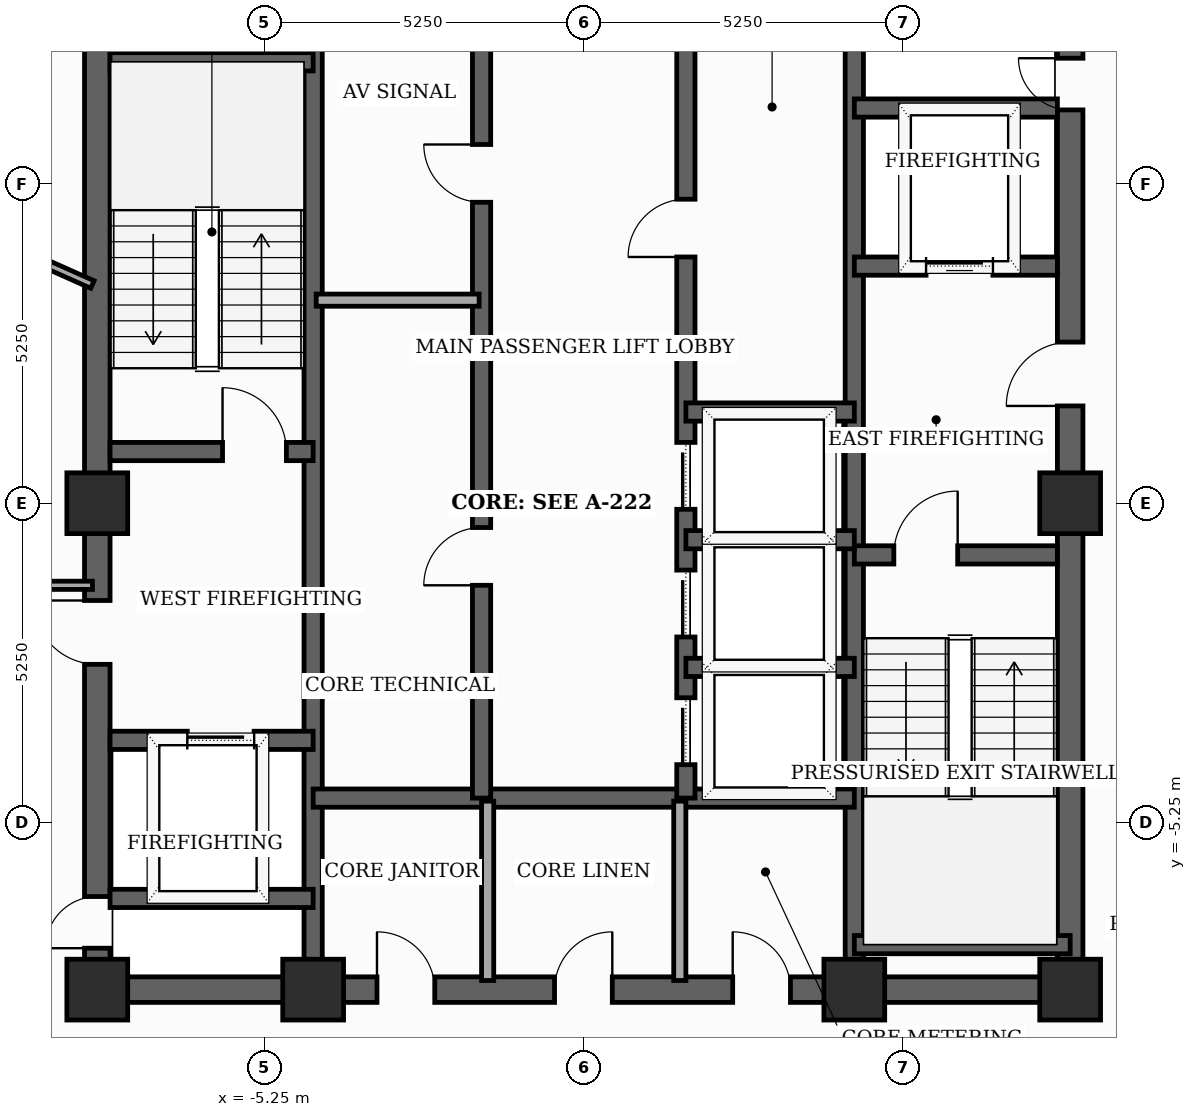
"""IFC4 building model, lengths in metres.
Left out: names, types, materials, properties, quantities, classifications, styles, units other than length and angle.
Written with IfcOpenShell. Run it as: python <this file> out.ifc"""

import sys

from ifc_helpers import new_model, si_unit, direction, frame, frame_2d, origin, origin_2d, place, context, subcontext, project, spatial, rectangle, extrude, element, fill, save


model = new_model("IFC4")
c1 = context("Model", 3, precision=1e-05, world=origin(), true_north=direction((0.0, 1.0)))
c2 = subcontext(c1, "Body", "Model", "MODEL_VIEW")
j1 = project(units=[si_unit("LENGTHUNIT", "METRE"), si_unit("PLANEANGLEUNIT", "RADIAN")], contexts=[c1])
p1 = place(None, origin())
s1 = spatial("IfcSite", under=j1, at=p1, CompositionType="ELEMENT")
p2 = place(p1, origin())
s2 = spatial("IfcBuilding", under=s1, at=p2, CompositionType="ELEMENT")
p3 = place(p2, frame((0.0, 0.0, 298.0)))
s3 = spatial("IfcBuildingStorey", under=s2, at=p3, CompositionType="ELEMENT", Elevation=298.0)
for number, where, z_axis, x_axis in (
    (1, (-8.0, -8.0, 0.0), (0.0, 0.0, 1.0), (1.0, 0.0, 0.0)),
    (2, (-4.45, -8.0, 0.0), (0.0, 0.0, 1.0), (1.0, 0.0, 0.0)),
    (3, (4.45, -8.0, 0.0), (0.0, 0.0, 1.0), (1.0, 0.0, 0.0)),
    (4, (8.0, -8.0, 0.0), (0.0, 0.0, 1.0), (1.0, 0.0, 0.0)),
    (5, (8.0, 0.0, 0.0), (0.0, 0.0, 1.0), (1.0, 0.0, 0.0)),
    (6, (-8.0, 0.0, 0.0), (0.0, 0.0, 1.0), (1.0, 0.0, 0.0)),
):
    element("IfcColumn", number, at=place(p3, frame(where, z_axis=z_axis, x_axis=x_axis)), inside=s3, PredefinedType="COLUMN", context=c2, shape_type="SweptSolid", body=[
        extrude(rectangle(XDim=1.0, YDim=1.0, at=origin_2d()), origin(), (0.0, 0.0, 1.0), 3.7),
    ])
p4 = place(p3, frame((-8.0, -8.0, 0.0), z_axis=(0.0, 0.0, 1.0), x_axis=(0.0, 1.0, 0.0)))
e7 = element("IfcWall", 7, at=p4, inside=s3, PredefinedType="SHEAR", context=c2, shape_type="SweptSolid", body=[
    extrude(rectangle(XDim=16.0, YDim=0.42, at=frame_2d((8.0, 0.0))), origin(), (0.0, 0.0, 1.0), 3.5),
])
p5 = place(p4, frame((0.681, 0.0, 0.0)))
e8 = element("IfcOpeningElement", 8, at=p5, cuts=e7, PredefinedType="OPENING", context=c2, shape_type="SweptSolid", body=[
    extrude(rectangle(XDim=0.85, YDim=2.02, at=frame_2d((0.425, 1.01))), frame((0.0, 0.22, 0.0), z_axis=(0.0, -1.0, 0.0), x_axis=(1.0, 0.0, 0.0)), (0.0, 0.0, 1.0), 0.44),
])
p6 = place(p4, frame((5.35, 0.0, 0.0)))
e9 = element("IfcOpeningElement", 9, at=p6, cuts=e7, PredefinedType="OPENING", context=c2, shape_type="SweptSolid", body=[
    extrude(rectangle(XDim=1.05, YDim=2.15, at=frame_2d((0.525, 1.075))), frame((0.0, 0.22, 0.0), z_axis=(0.0, -1.0, 0.0), x_axis=(1.0, 0.0, 0.0)), (0.0, 0.0, 1.0), 0.44),
])
p7 = place(p3, frame((8.0, -8.0, 0.0), z_axis=(0.0, 0.0, 1.0), x_axis=(0.0, 1.0, 0.0)))
e10 = element("IfcWall", 10, at=p7, inside=s3, PredefinedType="SHEAR", context=c2, shape_type="SweptSolid", body=[
    extrude(rectangle(XDim=16.0, YDim=0.42, at=frame_2d((8.0, 0.0))), origin(), (0.0, 0.0, 1.0), 3.5),
])
p8 = place(p7, frame((9.6, 0.0, 0.0)))
e11 = element("IfcOpeningElement", 11, at=p8, cuts=e10, PredefinedType="OPENING", context=c2, shape_type="SweptSolid", body=[
    extrude(rectangle(XDim=1.05, YDim=2.15, at=frame_2d((0.525, 1.075))), frame((0.0, 0.22, 0.0), z_axis=(0.0, -1.0, 0.0), x_axis=(1.0, 0.0, 0.0)), (0.0, 0.0, 1.0), 0.44),
])
p9 = place(p7, frame((14.469, 0.0, 0.0)))
e12 = element("IfcOpeningElement", 12, at=p9, cuts=e10, PredefinedType="OPENING", context=c2, shape_type="SweptSolid", body=[
    extrude(rectangle(XDim=0.85, YDim=2.02, at=frame_2d((0.425, 1.01))), frame((0.0, 0.22, 0.0), z_axis=(0.0, -1.0, 0.0), x_axis=(1.0, 0.0, 0.0)), (0.0, 0.0, 1.0), 0.44),
])
p10 = place(p3, frame((-8.0, -8.0, 0.0), z_axis=(0.0, 0.0, 1.0), x_axis=(1.0, 0.0, 0.0)))
e13 = element("IfcWall", 13, at=p10, inside=s3, PredefinedType="SHEAR", context=c2, shape_type="SweptSolid", body=[
    extrude(rectangle(XDim=16.0, YDim=0.42, at=frame_2d((8.0, 0.0))), origin(), (0.0, 0.0, 1.0), 3.5),
])
p11 = place(p10, frame((4.6, 0.0, 0.0)))
e14 = element("IfcOpeningElement", 14, at=p11, cuts=e13, PredefinedType="OPENING", context=c2, shape_type="SweptSolid", body=[
    extrude(rectangle(XDim=0.95, YDim=2.1, at=frame_2d((0.475, 1.05))), frame((0.0, 0.22, 0.0), z_axis=(0.0, -1.0, 0.0), x_axis=(1.0, 0.0, 0.0)), (0.0, 0.0, 1.0), 0.44),
])
p12 = place(p10, frame((7.52, 0.0, 0.0)))
e15 = element("IfcOpeningElement", 15, at=p12, cuts=e13, PredefinedType="OPENING", context=c2, shape_type="SweptSolid", body=[
    extrude(rectangle(XDim=0.95, YDim=2.1, at=frame_2d((0.475, 1.05))), frame((0.0, 0.22, 0.0), z_axis=(0.0, -1.0, 0.0), x_axis=(1.0, 0.0, 0.0)), (0.0, 0.0, 1.0), 0.44),
])
p13 = place(p10, frame((10.45, 0.0, 0.0)))
e16 = element("IfcOpeningElement", 16, at=p13, cuts=e13, PredefinedType="OPENING", context=c2, shape_type="SweptSolid", body=[
    extrude(rectangle(XDim=0.95, YDim=2.1, at=frame_2d((0.475, 1.05))), frame((0.0, 0.22, 0.0), z_axis=(0.0, -1.0, 0.0), x_axis=(1.0, 0.0, 0.0)), (0.0, 0.0, 1.0), 0.44),
])
for number, where, z_axis, x_axis in (
    (17, (-4.45, -7.79, 0.0), (0.0, 0.0, 1.0), (0.0, 1.0, 0.0)),
    (18, (4.45, -7.79, 0.0), (0.0, 0.0, 1.0), (0.0, 1.0, 0.0)),
):
    element("IfcWall", number, at=place(p3, frame(where, z_axis=z_axis, x_axis=x_axis)), inside=s3, PredefinedType="SHEAR", context=c2, shape_type="SweptSolid", body=[
        extrude(rectangle(XDim=15.58, YDim=0.3, at=frame_2d((7.79, 0.0))), origin(), (0.0, 0.0, 1.0), 3.5),
    ])
p14 = place(p3, frame((-7.79, 0.85, 0.0), z_axis=(0.0, 0.0, 1.0), x_axis=(1.0, 0.0, 0.0)))
e19 = element("IfcWall", 19, at=p14, inside=s3, PredefinedType="SHEAR", context=c2, shape_type="SweptSolid", body=[
    extrude(rectangle(XDim=3.34, YDim=0.3, at=frame_2d((1.67, 0.0))), origin(), (0.0, 0.0, 1.0), 3.5),
])
p15 = place(p14, frame((1.85, 0.0, 0.0)))
e20 = element("IfcOpeningElement", 20, at=p15, cuts=e19, PredefinedType="OPENING", context=c2, shape_type="SweptSolid", body=[
    extrude(rectangle(XDim=1.05, YDim=2.15, at=frame_2d((0.525, 1.075))), frame((0.0, 0.16, 0.0), z_axis=(0.0, -1.0, 0.0), x_axis=(1.0, 0.0, 0.0)), (0.0, 0.0, 1.0), 0.32),
])
p16 = place(p3, frame((-7.79, 7.26, 0.0), z_axis=(0.0, 0.0, 1.0), x_axis=(1.0, 0.0, 0.0)))
e21 = element("IfcWall", 21, at=p16, inside=s3, PredefinedType="SHEAR", context=c2, shape_type="SweptSolid", body=[
    extrude(rectangle(XDim=3.34, YDim=0.3, at=frame_2d((1.67, 0.0))), origin(), (0.0, 0.0, 1.0), 3.5),
])
p17 = place(p3, frame((4.45, -0.85, 0.0), z_axis=(0.0, 0.0, 1.0), x_axis=(1.0, 0.0, 0.0)))
e22 = element("IfcWall", 22, at=p17, inside=s3, PredefinedType="SHEAR", context=c2, shape_type="SweptSolid", body=[
    extrude(rectangle(XDim=3.34, YDim=0.3, at=frame_2d((1.67, 0.0))), origin(), (0.0, 0.0, 1.0), 3.5),
])
p18 = place(p17, frame((0.65, 0.0, 0.0)))
e23 = element("IfcOpeningElement", 23, at=p18, cuts=e22, PredefinedType="OPENING", context=c2, shape_type="SweptSolid", body=[
    extrude(rectangle(XDim=1.05, YDim=2.15, at=frame_2d((0.525, 1.075))), frame((0.0, 0.16, 0.0), z_axis=(0.0, -1.0, 0.0), x_axis=(1.0, 0.0, 0.0)), (0.0, 0.0, 1.0), 0.32),
])
p19 = place(p3, frame((4.45, -7.26, 0.0), z_axis=(0.0, 0.0, 1.0), x_axis=(1.0, 0.0, 0.0)))
e24 = element("IfcWall", 24, at=p19, inside=s3, PredefinedType="SHEAR", context=c2, shape_type="SweptSolid", body=[
    extrude(rectangle(XDim=3.55, YDim=0.3, at=frame_2d((1.775, 0.0))), origin(), (0.0, 0.0, 1.0), 3.5),
])
p20 = place(p3, frame((-7.79, -3.9, 0.0), z_axis=(0.0, 0.0, 1.0), x_axis=(1.0, 0.0, 0.0)))
e25 = element("IfcWall", 25, at=p20, inside=s3, PredefinedType="SHEAR", context=c2, shape_type="SweptSolid", body=[
    extrude(rectangle(XDim=3.34, YDim=0.3, at=frame_2d((1.67, 0.0))), origin(), (0.0, 0.0, 1.0), 3.5),
])
p21 = place(p20, frame((1.27, 0.0, 0.0)))
e26 = element("IfcOpeningElement", 26, at=p21, cuts=e25, PredefinedType="OPENING", context=c2, shape_type="SweptSolid", body=[
    extrude(rectangle(XDim=1.1, YDim=2.1, at=frame_2d((0.55, 1.05))), frame((0.0, 0.16, 0.0), z_axis=(0.0, -1.0, 0.0), x_axis=(1.0, 0.0, 0.0)), (0.0, 0.0, 1.0), 0.32),
])
p22 = place(p3, frame((-7.79, -6.5, 0.0), z_axis=(0.0, 0.0, 1.0), x_axis=(1.0, 0.0, 0.0)))
e27 = element("IfcWall", 27, at=p22, inside=s3, PredefinedType="SHEAR", context=c2, shape_type="SweptSolid", body=[
    extrude(rectangle(XDim=3.34, YDim=0.3, at=frame_2d((1.67, 0.0))), origin(), (0.0, 0.0, 1.0), 3.5),
])
p23 = place(p3, frame((4.45, 3.9, 0.0), z_axis=(0.0, 0.0, 1.0), x_axis=(1.0, 0.0, 0.0)))
e28 = element("IfcWall", 28, at=p23, inside=s3, PredefinedType="SHEAR", context=c2, shape_type="SweptSolid", body=[
    extrude(rectangle(XDim=3.34, YDim=0.3, at=frame_2d((1.67, 0.0))), origin(), (0.0, 0.0, 1.0), 3.5),
])
p24 = place(p23, frame((1.18, 0.0, 0.0)))
e29 = element("IfcOpeningElement", 29, at=p24, cuts=e28, PredefinedType="OPENING", context=c2, shape_type="SweptSolid", body=[
    extrude(rectangle(XDim=1.1, YDim=2.1, at=frame_2d((0.55, 1.05))), frame((0.0, 0.16, 0.0), z_axis=(0.0, -1.0, 0.0), x_axis=(1.0, 0.0, 0.0)), (0.0, 0.0, 1.0), 0.32),
])
p25 = place(p3, frame((4.45, 6.5, 0.0), z_axis=(0.0, 0.0, 1.0), x_axis=(1.0, 0.0, 0.0)))
e30 = element("IfcWall", 30, at=p25, inside=s3, PredefinedType="SHEAR", context=c2, shape_type="SweptSolid", body=[
    extrude(rectangle(XDim=3.34, YDim=0.3, at=frame_2d((1.67, 0.0))), origin(), (0.0, 0.0, 1.0), 3.5),
])
p26 = place(p3, frame((-4.45, -4.85, 0.0), z_axis=(0.0, 0.0, 1.0), x_axis=(1.0, 0.0, 0.0)))
e31 = element("IfcWall", 31, at=p26, inside=s3, PredefinedType="SHEAR", context=c2, shape_type="SweptSolid", body=[
    extrude(rectangle(XDim=8.9, YDim=0.3, at=frame_2d((4.45, 0.0))), origin(), (0.0, 0.0, 1.0), 3.5),
])
p27 = place(p3, frame((-1.68, -4.85, 0.0), z_axis=(0.0, 0.0, 1.0), x_axis=(0.0, 1.0, 0.0)))
e32 = element("IfcWall", 32, at=p27, inside=s3, PredefinedType="SHEAR", context=c2, shape_type="SweptSolid", body=[
    extrude(rectangle(XDim=12.64, YDim=0.3, at=frame_2d((6.32, 0.0))), origin(), (0.0, 0.0, 1.0), 3.5),
])
p28 = place(p27, frame((3.5, 0.0, 0.0)))
e33 = element("IfcOpeningElement", 33, at=p28, cuts=e32, PredefinedType="OPENING", context=c2, shape_type="SweptSolid", body=[
    extrude(rectangle(XDim=0.95, YDim=2.1, at=frame_2d((0.475, 1.05))), frame((0.0, 0.16, 0.0), z_axis=(0.0, -1.0, 0.0), x_axis=(1.0, 0.0, 0.0)), (0.0, 0.0, 1.0), 0.32),
])
p29 = place(p27, frame((9.8, 0.0, 0.0)))
e34 = element("IfcOpeningElement", 34, at=p29, cuts=e32, PredefinedType="OPENING", context=c2, shape_type="SweptSolid", body=[
    extrude(rectangle(XDim=0.95, YDim=2.1, at=frame_2d((0.475, 1.05))), frame((0.0, 0.16, 0.0), z_axis=(0.0, -1.0, 0.0), x_axis=(1.0, 0.0, 0.0)), (0.0, 0.0, 1.0), 0.32),
])
p30 = place(p3, frame((1.68, -4.85, 0.0), z_axis=(0.0, 0.0, 1.0), x_axis=(0.0, 1.0, 0.0)))
e35 = element("IfcWall", 35, at=p30, inside=s3, PredefinedType="SHEAR", context=c2, shape_type="SweptSolid", body=[
    extrude(rectangle(XDim=12.64, YDim=0.3, at=frame_2d((6.32, 0.0))), origin(), (0.0, 0.0, 1.0), 3.5),
])
p31 = place(p30, frame((0.55, 0.0, 0.0)))
e36 = element("IfcOpeningElement", 36, at=p31, cuts=e35, PredefinedType="OPENING", context=c2, shape_type="SweptSolid", body=[
    extrude(rectangle(XDim=1.1, YDim=2.1, at=frame_2d((0.55, 1.05))), frame((0.0, 0.16, 0.0), z_axis=(0.0, -1.0, 0.0), x_axis=(1.0, 0.0, 0.0)), (0.0, 0.0, 1.0), 0.32),
])
p32 = place(p30, frame((2.65, 0.0, 0.0)))
e37 = element("IfcOpeningElement", 37, at=p32, cuts=e35, PredefinedType="OPENING", context=c2, shape_type="SweptSolid", body=[
    extrude(rectangle(XDim=1.1, YDim=2.1, at=frame_2d((0.55, 1.05))), frame((0.0, 0.16, 0.0), z_axis=(0.0, -1.0, 0.0), x_axis=(1.0, 0.0, 0.0)), (0.0, 0.0, 1.0), 0.32),
])
p33 = place(p30, frame((4.75, 0.0, 0.0)))
e38 = element("IfcOpeningElement", 38, at=p33, cuts=e35, PredefinedType="OPENING", context=c2, shape_type="SweptSolid", body=[
    extrude(rectangle(XDim=1.1, YDim=2.1, at=frame_2d((0.55, 1.05))), frame((0.0, 0.16, 0.0), z_axis=(0.0, -1.0, 0.0), x_axis=(1.0, 0.0, 0.0)), (0.0, 0.0, 1.0), 0.32),
])
p34 = place(p30, frame((8.9, 0.0, 0.0)))
e39 = element("IfcOpeningElement", 39, at=p34, cuts=e35, PredefinedType="OPENING", context=c2, shape_type="SweptSolid", body=[
    extrude(rectangle(XDim=0.95, YDim=2.1, at=frame_2d((0.475, 1.05))), frame((0.0, 0.16, 0.0), z_axis=(0.0, -1.0, 0.0), x_axis=(1.0, 0.0, 0.0)), (0.0, 0.0, 1.0), 0.32),
])
for number, where, z_axis, x_axis in (
    (40, (1.68, 1.5, 0.0), (0.0, 0.0, 1.0), (1.0, 0.0, 0.0)),
    (41, (1.68, -2.7, 0.0), (0.0, 0.0, 1.0), (1.0, 0.0, 0.0)),
    (42, (1.68, -0.6, 0.0), (0.0, 0.0, 1.0), (1.0, 0.0, 0.0)),
):
    element("IfcWall", number, at=place(p3, frame(where, z_axis=z_axis, x_axis=x_axis)), inside=s3, PredefinedType="SHEAR", context=c2, shape_type="SweptSolid", body=[
        extrude(rectangle(XDim=2.77, YDim=0.3, at=frame_2d((1.385, 0.0))), origin(), (0.0, 0.0, 1.0), 3.5),
    ])
for number, where, z_axis, x_axis in (
    (43, (-1.58, -7.85, 0.0), (0.0, 0.0, 1.0), (0.0, 1.0, 0.0)),
    (44, (1.58, -7.85, 0.0), (0.0, 0.0, 1.0), (0.0, 1.0, 0.0)),
):
    element("IfcWall", number, at=place(p3, frame(where, z_axis=z_axis, x_axis=x_axis)), inside=s3, PredefinedType="SOLIDWALL", context=c2, shape_type="SweptSolid", body=[
        extrude(rectangle(XDim=2.95, YDim=0.2, at=frame_2d((1.475, 0.0))), origin(), (0.0, 0.0, 1.0), 2.885),
    ])
p35 = place(p3, frame((-4.4, 3.34, 0.0), z_axis=(0.0, 0.0, 1.0), x_axis=(1.0, 0.0, 0.0)))
e45 = element("IfcWall", 45, at=p35, inside=s3, PredefinedType="SOLIDWALL", context=c2, shape_type="SweptSolid", body=[
    extrude(rectangle(XDim=2.68, YDim=0.2, at=frame_2d((1.34, 0.0))), origin(), (0.0, 0.0, 1.0), 3.5),
])
p36 = place(p3, frame((-8.08, -1.35, 0.0), z_axis=(0.0, 0.0, 1.0), x_axis=(-1.0, 0.0, 0.0)))
e46 = element("IfcWall", 46, at=p36, inside=s3, PredefinedType="PARTITIONING", context=c2, shape_type="SweptSolid", body=[
    extrude(rectangle(XDim=2.57, YDim=0.135, at=frame_2d((1.285, 0.0))), origin(), (0.0, 0.0, 1.0), 2.885),
])
p37 = place(p3, frame((-8.08, 3.597, 0.0), z_axis=(0.0, 0.0, 1.0), x_axis=(-0.913542590258, 0.406743083266, 0.0)))
e47 = element("IfcWall", 47, at=p37, inside=s3, PredefinedType="PARTITIONING", context=c2, shape_type="SweptSolid", body=[
    extrude(rectangle(XDim=18.505, YDim=0.135, at=frame_2d((9.252, 0.0))), origin(), (0.0, 0.0, 1.0), 2.885),
])
p38 = place(p37, frame((8.792, 0.0, 0.0)))
e48 = element("IfcOpeningElement", 48, at=p38, cuts=e47, PredefinedType="OPENING", context=c2, shape_type="SweptSolid", body=[
    extrude(rectangle(XDim=0.92, YDim=2.1, at=frame_2d((0.46, 1.05))), frame((0.0, 0.077, 0.0), z_axis=(0.0, -1.0, 0.0), x_axis=(1.0, 0.0, 0.0)), (0.0, 0.0, 1.0), 0.155),
])
p39 = place(p5, origin())
e49 = element("IfcDoor", 49, at=p39, inside=s3, OperationType="SINGLE_SWING_LEFT", PredefinedType="TRAPDOOR", context=c2, shape_type="SweptSolid", body=[
    extrude(rectangle(XDim=0.85, YDim=2.02, at=frame_2d((0.425, 1.01))), frame((0.0, 0.025, 0.0), z_axis=(0.0, -1.0, 0.0), x_axis=(1.0, 0.0, 0.0)), (0.0, 0.0, 1.0), 0.05),
])
fill(e8, e49)
p40 = place(p6, origin())
e50 = element("IfcDoor", 50, at=p40, inside=s3, OperationType="SINGLE_SWING_RIGHT", PredefinedType="DOOR", context=c2, shape_type="SweptSolid", body=[
    extrude(rectangle(XDim=1.05, YDim=2.15, at=frame_2d((0.525, 1.075))), frame((0.0, 0.025, 0.0), z_axis=(0.0, -1.0, 0.0), x_axis=(1.0, 0.0, 0.0)), (0.0, 0.0, 1.0), 0.05),
])
fill(e9, e50)
p41 = place(p8, origin())
e51 = element("IfcDoor", 51, at=p41, inside=s3, OperationType="SINGLE_SWING_LEFT", PredefinedType="DOOR", context=c2, shape_type="SweptSolid", body=[
    extrude(rectangle(XDim=1.05, YDim=2.15, at=frame_2d((0.525, 1.075))), frame((0.0, 0.025, 0.0), z_axis=(0.0, -1.0, 0.0), x_axis=(1.0, 0.0, 0.0)), (0.0, 0.0, 1.0), 0.05),
])
fill(e11, e51)
p42 = place(p9, origin())
e52 = element("IfcDoor", 52, at=p42, inside=s3, OperationType="SINGLE_SWING_RIGHT", PredefinedType="TRAPDOOR", context=c2, shape_type="SweptSolid", body=[
    extrude(rectangle(XDim=0.85, YDim=2.02, at=frame_2d((0.425, 1.01))), frame((0.0, 0.025, 0.0), z_axis=(0.0, -1.0, 0.0), x_axis=(1.0, 0.0, 0.0)), (0.0, 0.0, 1.0), 0.05),
])
fill(e12, e52)
p43 = place(p11, origin())
e53 = element("IfcDoor", 53, at=p43, inside=s3, OperationType="SINGLE_SWING_LEFT", PredefinedType="DOOR", context=c2, shape_type="SweptSolid", body=[
    extrude(rectangle(XDim=0.95, YDim=2.1, at=frame_2d((0.475, 1.05))), frame((0.0, 0.025, 0.0), z_axis=(0.0, -1.0, 0.0), x_axis=(1.0, 0.0, 0.0)), (0.0, 0.0, 1.0), 0.05),
])
fill(e14, e53)
p44 = place(p12, origin())
e54 = element("IfcDoor", 54, at=p44, inside=s3, OperationType="SINGLE_SWING_RIGHT", PredefinedType="DOOR", context=c2, shape_type="SweptSolid", body=[
    extrude(rectangle(XDim=0.95, YDim=2.1, at=frame_2d((0.475, 1.05))), frame((0.0, 0.025, 0.0), z_axis=(0.0, -1.0, 0.0), x_axis=(1.0, 0.0, 0.0)), (0.0, 0.0, 1.0), 0.05),
])
fill(e15, e54)
p45 = place(p13, origin())
e55 = element("IfcDoor", 55, at=p45, inside=s3, OperationType="SINGLE_SWING_LEFT", PredefinedType="DOOR", context=c2, shape_type="SweptSolid", body=[
    extrude(rectangle(XDim=0.95, YDim=2.1, at=frame_2d((0.475, 1.05))), frame((0.0, 0.025, 0.0), z_axis=(0.0, -1.0, 0.0), x_axis=(1.0, 0.0, 0.0)), (0.0, 0.0, 1.0), 0.05),
])
fill(e16, e55)
p46 = place(p15, origin())
e56 = element("IfcDoor", 56, at=p46, inside=s3, OperationType="SINGLE_SWING_LEFT", PredefinedType="DOOR", context=c2, shape_type="SweptSolid", body=[
    extrude(rectangle(XDim=1.05, YDim=2.15, at=frame_2d((0.525, 1.075))), frame((0.0, 0.025, 0.0), z_axis=(0.0, -1.0, 0.0), x_axis=(1.0, 0.0, 0.0)), (0.0, 0.0, 1.0), 0.05),
])
fill(e20, e56)
p47 = place(p18, origin())
e57 = element("IfcDoor", 57, at=p47, inside=s3, OperationType="SINGLE_SWING_RIGHT", PredefinedType="DOOR", context=c2, shape_type="SweptSolid", body=[
    extrude(rectangle(XDim=1.05, YDim=2.15, at=frame_2d((0.525, 1.075))), frame((0.0, 0.025, 0.0), z_axis=(0.0, -1.0, 0.0), x_axis=(1.0, 0.0, 0.0)), (0.0, 0.0, 1.0), 0.05),
])
fill(e23, e57)
p48 = place(p21, origin())
e58 = element("IfcDoor", 58, at=p48, inside=s3, OperationType="SLIDING_TO_LEFT", PredefinedType="DOOR", context=c2, shape_type="SweptSolid", body=[
    extrude(rectangle(XDim=1.1, YDim=2.1, at=frame_2d((0.55, 1.05))), frame((0.0, 0.025, 0.0), z_axis=(0.0, -1.0, 0.0), x_axis=(1.0, 0.0, 0.0)), (0.0, 0.0, 1.0), 0.05),
])
fill(e26, e58)
p49 = place(p24, origin())
e59 = element("IfcDoor", 59, at=p49, inside=s3, OperationType="SLIDING_TO_LEFT", PredefinedType="DOOR", context=c2, shape_type="SweptSolid", body=[
    extrude(rectangle(XDim=1.1, YDim=2.1, at=frame_2d((0.55, 1.05))), frame((0.0, 0.025, 0.0), z_axis=(0.0, -1.0, 0.0), x_axis=(1.0, 0.0, 0.0)), (0.0, 0.0, 1.0), 0.05),
])
fill(e29, e59)
p50 = place(p28, origin())
e60 = element("IfcDoor", 60, at=p50, inside=s3, OperationType="SINGLE_SWING_LEFT", PredefinedType="DOOR", context=c2, shape_type="SweptSolid", body=[
    extrude(rectangle(XDim=0.95, YDim=2.1, at=frame_2d((0.475, 1.05))), frame((0.0, 0.025, 0.0), z_axis=(0.0, -1.0, 0.0), x_axis=(1.0, 0.0, 0.0)), (0.0, 0.0, 1.0), 0.05),
])
fill(e33, e60)
p51 = place(p29, origin())
e61 = element("IfcDoor", 61, at=p51, inside=s3, OperationType="SINGLE_SWING_RIGHT", PredefinedType="DOOR", context=c2, shape_type="SweptSolid", body=[
    extrude(rectangle(XDim=0.95, YDim=2.1, at=frame_2d((0.475, 1.05))), frame((0.0, 0.025, 0.0), z_axis=(0.0, -1.0, 0.0), x_axis=(1.0, 0.0, 0.0)), (0.0, 0.0, 1.0), 0.05),
])
fill(e34, e61)
p52 = place(p31, origin())
e62 = element("IfcDoor", 62, at=p52, inside=s3, OperationType="SLIDING_TO_LEFT", PredefinedType="DOOR", context=c2, shape_type="SweptSolid", body=[
    extrude(rectangle(XDim=1.1, YDim=2.1, at=frame_2d((0.55, 1.05))), frame((0.0, 0.025, 0.0), z_axis=(0.0, -1.0, 0.0), x_axis=(1.0, 0.0, 0.0)), (0.0, 0.0, 1.0), 0.05),
])
fill(e36, e62)
p53 = place(p32, origin())
e63 = element("IfcDoor", 63, at=p53, inside=s3, OperationType="SLIDING_TO_LEFT", PredefinedType="DOOR", context=c2, shape_type="SweptSolid", body=[
    extrude(rectangle(XDim=1.1, YDim=2.1, at=frame_2d((0.55, 1.05))), frame((0.0, 0.025, 0.0), z_axis=(0.0, -1.0, 0.0), x_axis=(1.0, 0.0, 0.0)), (0.0, 0.0, 1.0), 0.05),
])
fill(e37, e63)
p54 = place(p33, origin())
e64 = element("IfcDoor", 64, at=p54, inside=s3, OperationType="SLIDING_TO_LEFT", PredefinedType="DOOR", context=c2, shape_type="SweptSolid", body=[
    extrude(rectangle(XDim=1.1, YDim=2.1, at=frame_2d((0.55, 1.05))), frame((0.0, 0.025, 0.0), z_axis=(0.0, -1.0, 0.0), x_axis=(1.0, 0.0, 0.0)), (0.0, 0.0, 1.0), 0.05),
])
fill(e38, e64)
p55 = place(p34, origin())
e65 = element("IfcDoor", 65, at=p55, inside=s3, OperationType="SINGLE_SWING_LEFT", PredefinedType="DOOR", context=c2, shape_type="SweptSolid", body=[
    extrude(rectangle(XDim=0.95, YDim=2.1, at=frame_2d((0.475, 1.05))), frame((0.0, 0.025, 0.0), z_axis=(0.0, -1.0, 0.0), x_axis=(1.0, 0.0, 0.0)), (0.0, 0.0, 1.0), 0.05),
])
fill(e39, e65)
save(model, sys.argv[1])
